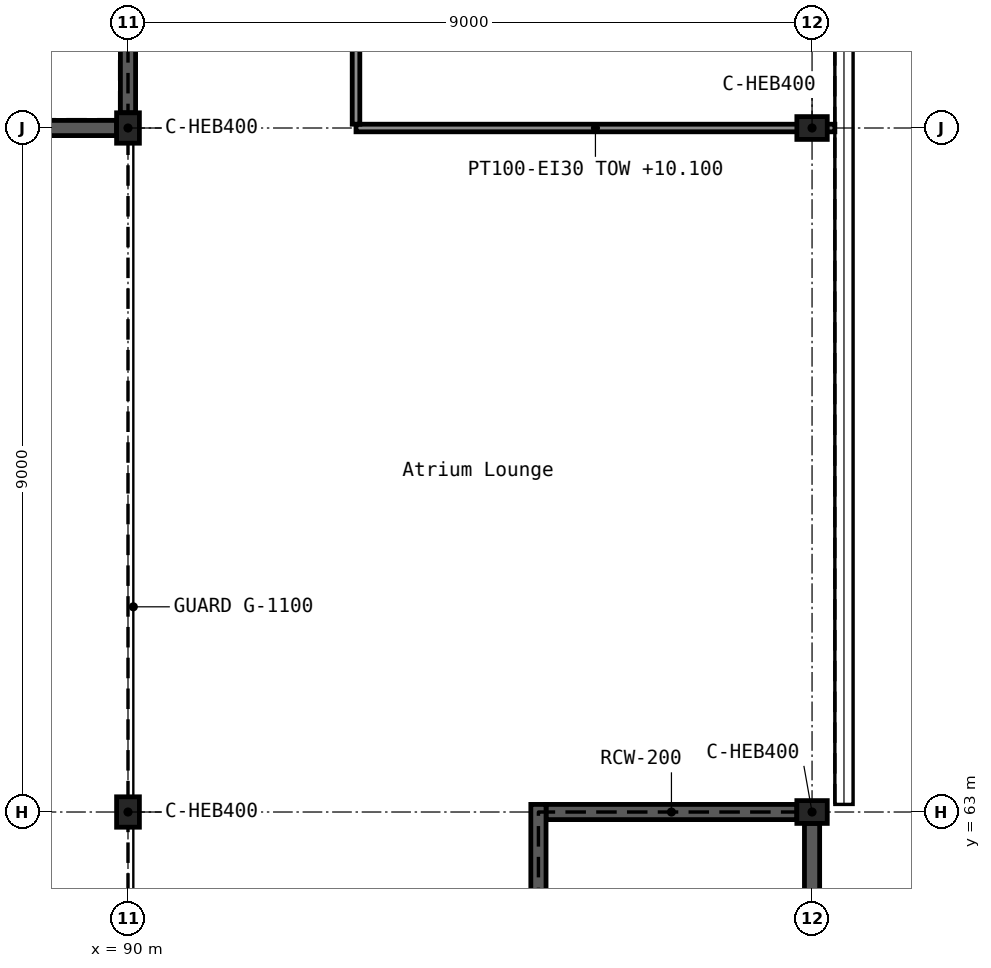
"""IFC4 building model, lengths in metres.
Left out: names, types, materials, properties, quantities, classifications, styles, units other than length and angle.
Written with IfcOpenShell. Run it as: python <this file> out.ifc"""

import sys

from ifc_helpers import new_model, si_unit, direction, frame, frame_2d, origin, origin_2d, place, context, subcontext, project, spatial, rectangle, i_section, extrude, element, save


model = new_model("IFC4")
c1 = context("Model", 3, precision=1e-05, world=origin(), true_north=direction((0.0, 1.0)))
c2 = subcontext(c1, "Body", "Model", "MODEL_VIEW")
j1 = project(units=[si_unit("LENGTHUNIT", "METRE"), si_unit("PLANEANGLEUNIT", "RADIAN")], contexts=[c1])
p1 = place(None, origin())
s1 = spatial("IfcSite", under=j1, at=p1, CompositionType="ELEMENT")
p2 = place(p1, origin())
s2 = spatial("IfcBuilding", under=s1, at=p2, CompositionType="ELEMENT")
p3 = place(p2, frame((0.0, 0.0, 5.4)))
s3 = spatial("IfcBuildingStorey", under=s2, at=p3, CompositionType="ELEMENT", Elevation=5.4)
for number, where, z_axis, x_axis in (
    (1, (90.0, 63.0, 0.0), (0.0, 0.0, 1.0), (1.0, 0.0, 0.0)),
    (2, (99.0, 63.0, 0.0), (0.0, 0.0, 1.0), (0.0, 1.0, 0.0)),
    (3, (90.0, 72.0, 0.0), (0.0, 0.0, 1.0), (1.0, 0.0, 0.0)),
    (4, (99.0, 72.0, 0.0), (0.0, 0.0, 1.0), (0.0, 1.0, 0.0)),
):
    element("IfcColumn", number, at=place(p3, frame(where, z_axis=z_axis, x_axis=x_axis)), inside=s3, PredefinedType="COLUMN", context=c2, shape_type="SweptSolid", body=[
        extrude(i_section(OverallWidth=0.3, OverallDepth=0.4, WebThickness=0.013, FlangeThickness=0.024, FilletRadius=0.027, at=origin_2d()), origin(), (0.0, 0.0, 1.0), 5.4),
    ])
p4 = place(p3, frame((81.15, 72.0, 0.0), z_axis=(0.0, 0.0, 1.0), x_axis=(1.0, 0.0, 0.0)))
e5 = element("IfcWall", 5, at=p4, inside=s3, PredefinedType="SHEAR", context=c2, shape_type="SweptSolid", body=[
    extrude(rectangle(XDim=8.7, YDim=0.2, at=frame_2d((4.35, 0.0))), origin(), (0.0, 0.0, 1.0), 5.4),
])
p5 = place(p3, frame((90.0, 72.2, 0.0), z_axis=(0.0, 0.0, 1.0), x_axis=(0.0, 1.0, 0.0)))
e6 = element("IfcWall", 6, at=p5, inside=s3, PredefinedType="SHEAR", context=c2, shape_type="SweptSolid", body=[
    extrude(rectangle(XDim=8.6, YDim=0.2, at=frame_2d((4.3, 0.0))), origin(), (0.0, 0.0, 1.0), 5.4),
])
p6 = place(p3, frame((95.5, 63.0, 0.0), z_axis=(0.0, 0.0, 1.0), x_axis=(1.0, 0.0, 0.0)))
e7 = element("IfcWall", 7, at=p6, inside=s3, PredefinedType="SHEAR", context=c2, shape_type="SweptSolid", body=[
    extrude(rectangle(XDim=3.3, YDim=0.2, at=frame_2d((1.65, 0.0))), origin(), (0.0, 0.0, 1.0), 5.4),
])
p7 = place(p3, frame((95.4, 53.9, 0.0), z_axis=(0.0, 0.0, 1.0), x_axis=(0.0, 1.0, 0.0)))
e8 = element("IfcWall", 8, at=p7, inside=s3, PredefinedType="SHEAR", context=c2, shape_type="SweptSolid", body=[
    extrude(rectangle(XDim=9.2, YDim=0.2, at=frame_2d((4.6, 0.0))), origin(), (0.0, 0.0, 1.0), 5.4),
])
p8 = place(p7, frame((1.8, 0.0, 0.0)))
e9 = element("IfcOpeningElement", 9, at=p8, cuts=e8, PredefinedType="OPENING", context=c2, shape_type="SweptSolid", body=[
    extrude(rectangle(XDim=1.1, YDim=2.1, at=frame_2d((0.55, 1.05))), frame((0.0, 0.111, 0.0), z_axis=(0.0, -1.0, 0.0), x_axis=(1.0, 0.0, 0.0)), (0.0, 0.0, 1.0), 0.222),
])
p9 = place(p7, frame((6.3, 0.0, 0.0)))
e10 = element("IfcOpeningElement", 10, at=p9, cuts=e8, PredefinedType="OPENING", context=c2, shape_type="SweptSolid", body=[
    extrude(rectangle(XDim=1.1, YDim=2.1, at=frame_2d((0.55, 1.05))), frame((0.0, 0.111, 0.0), z_axis=(0.0, -1.0, 0.0), x_axis=(1.0, 0.0, 0.0)), (0.0, 0.0, 1.0), 0.222),
])
p10 = place(p3, frame((99.0, 54.15, 0.0), z_axis=(0.0, 0.0, 1.0), x_axis=(0.0, 1.0, 0.0)))
e11 = element("IfcWall", 11, at=p10, inside=s3, PredefinedType="SHEAR", context=c2, shape_type="SweptSolid", body=[
    extrude(rectangle(XDim=8.7, YDim=0.2, at=frame_2d((4.35, 0.0))), origin(), (0.0, 0.0, 1.0), 5.4),
])
p11 = place(p3, frame((93.0, 72.0, 0.0), z_axis=(0.0, 0.0, 1.0), x_axis=(1.0, 0.0, 0.0)))
e12 = element("IfcWall", 12, at=p11, inside=s3, PredefinedType="PARTITIONING", context=c2, shape_type="SweptSolid", body=[
    extrude(rectangle(XDim=6.3, YDim=0.1, at=frame_2d((3.15, 0.0))), origin(), (0.0, 0.0, 1.0), 4.7),
])
p12 = place(p3, frame((93.0, 72.05, 0.0), z_axis=(0.0, 0.0, 1.0), x_axis=(0.0, 1.0, 0.0)))
e13 = element("IfcWall", 13, at=p12, inside=s3, PredefinedType="PARTITIONING", context=c2, shape_type="SweptSolid", body=[
    extrude(rectangle(XDim=8.9, YDim=0.1, at=frame_2d((4.45, 0.0))), origin(), (0.0, 0.0, 1.0), 4.85),
])
p13 = place(p12, frame((3.95, 0.0, 0.0)))
e14 = element("IfcOpeningElement", 14, at=p13, cuts=e13, PredefinedType="OPENING", context=c2, shape_type="SweptSolid", body=[
    extrude(rectangle(XDim=1.0, YDim=2.1, at=frame_2d((0.5, 1.05))), frame((0.0, 0.061, 0.0), z_axis=(0.0, -1.0, 0.0), x_axis=(1.0, 0.0, 0.0)), (0.0, 0.0, 1.0), 0.122),
])
save(model, sys.argv[1])
